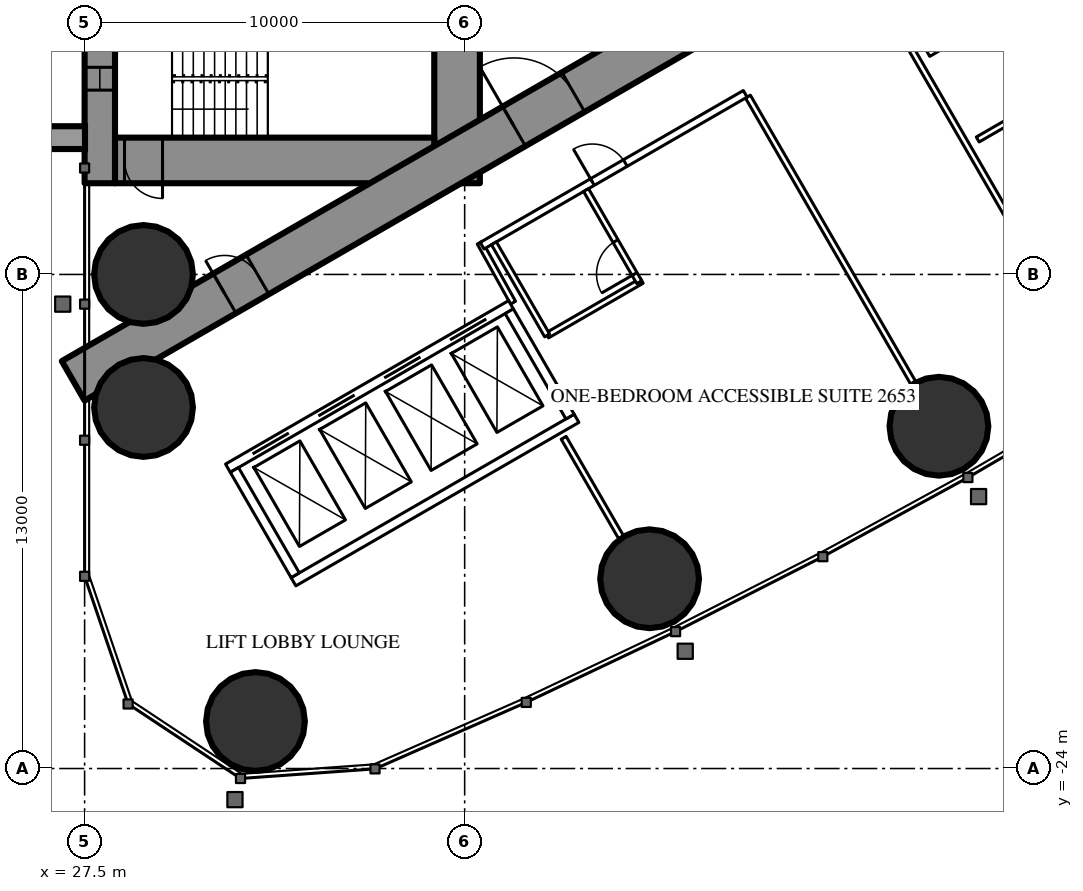
"""IFC4 building model, lengths in metres.
Left out: names, types, materials, properties, quantities, classifications, styles, units other than length and angle.
Written with IfcOpenShell. Run it as: python <this file> out.ifc"""

import sys

from ifc_helpers import new_model, si_unit, direction, frame, frame_2d, origin, origin_2d, place, context, subcontext, project, spatial, rectangle, hollow_circle, extrude, element, fill, save


model = new_model("IFC4")
c1 = context("Model", 3, precision=1e-05, world=origin(), true_north=direction((0.0, 1.0)))
c2 = subcontext(c1, "Body", "Model", "MODEL_VIEW")
j1 = project(units=[si_unit("LENGTHUNIT", "METRE"), si_unit("PLANEANGLEUNIT", "RADIAN")], contexts=[c1])
p1 = place(None, origin())
s1 = spatial("IfcSite", under=j1, at=p1, CompositionType="ELEMENT")
p2 = place(p1, origin())
s2 = spatial("IfcBuilding", under=s1, at=p2, CompositionType="ELEMENT")
p3 = place(p2, frame((0.0, 0.0, 101.1)))
s3 = spatial("IfcBuildingStorey", under=s2, at=p3, CompositionType="ELEMENT", Elevation=101.1)
for number, where, z_axis, x_axis in (
    (1, (31.996, -22.763, 0.0), (0.0, 0.0, 1.0), (1.0, 0.0, 0.0)),
    (2, (29.05, -11.0, 0.0), (0.0, 0.0, 1.0), (1.0, 0.0, 0.0)),
    (3, (29.05, -14.5, 0.0), (0.0, 0.0, 1.0), (1.0, 0.0, 0.0)),
    (4, (42.366, -19.007, 0.0), (0.0, 0.0, 1.0), (1.0, 0.0, 0.0)),
    (5, (49.979, -14.994, 0.0), (0.0, 0.0, 1.0), (1.0, 0.0, 0.0)),
):
    element("IfcColumn", number, at=place(p3, frame(where, z_axis=z_axis, x_axis=x_axis)), inside=s3, PredefinedType="COLUMN", context=c2, shape_type="SweptSolid", body=[
        extrude(hollow_circle(Radius=1.3, WallThickness=0.1, at=origin_2d()), origin(), (0.0, 0.0, 1.0), 3.5),
    ])
p4 = place(p3, frame((27.9, -8.6, 0.0), z_axis=(0.0, 0.0, 1.0), x_axis=(0.0, 1.0, 0.0)))
e6 = element("IfcWall", 6, at=p4, inside=s3, PredefinedType="SHEAR", context=c2, shape_type="SweptSolid", body=[
    extrude(rectangle(XDim=17.2, YDim=0.8, at=frame_2d((8.6, 0.0))), origin(), (0.0, 0.0, 1.0), 3.5),
])
p5 = place(p4, frame((2.45, 0.0, 0.6)))
e7 = element("IfcOpeningElement", 7, at=p5, cuts=e6, PredefinedType="OPENING", context=c2, shape_type="SweptSolid", body=[
    extrude(rectangle(XDim=0.6, YDim=2.1, at=frame_2d((0.3, 1.05))), frame((0.0, 0.41, 0.0), z_axis=(0.0, -1.0, 0.0), x_axis=(1.0, 0.0, 0.0)), (0.0, 0.0, 1.0), 0.82),
])
p6 = place(p4, frame((14.15, 0.0, 0.6)))
e8 = element("IfcOpeningElement", 8, at=p6, cuts=e6, PredefinedType="OPENING", context=c2, shape_type="SweptSolid", body=[
    extrude(rectangle(XDim=0.6, YDim=2.1, at=frame_2d((0.3, 1.05))), frame((0.0, 0.41, 0.0), z_axis=(0.0, -1.0, 0.0), x_axis=(1.0, 0.0, 0.0)), (0.0, 0.0, 1.0), 0.82),
])
p7 = place(p3, frame((37.3, -8.6, 0.0), z_axis=(0.0, 0.0, 1.0), x_axis=(0.0, 1.0, 0.0)))
e9 = element("IfcWall", 9, at=p7, inside=s3, PredefinedType="SHEAR", context=c2, shape_type="SweptSolid", body=[
    extrude(rectangle(XDim=17.2, YDim=1.2, at=frame_2d((8.6, 0.0))), origin(), (0.0, 0.0, 1.0), 3.5),
])
p8 = place(p7, frame((7.7, 0.0, 0.0)))
e10 = element("IfcOpeningElement", 10, at=p8, cuts=e9, PredefinedType="OPENING", context=c2, shape_type="SweptSolid", body=[
    extrude(rectangle(XDim=1.8, YDim=2.2, at=frame_2d((0.9, 1.1))), frame((0.0, 0.61, 0.0), z_axis=(0.0, -1.0, 0.0), x_axis=(1.0, 0.0, 0.0)), (0.0, 0.0, 1.0), 1.22),
])
p9 = place(p3, frame((28.3, -8.0, 0.0), z_axis=(0.0, 0.0, 1.0), x_axis=(1.0, 0.0, 0.0)))
e11 = element("IfcWall", 11, at=p9, inside=s3, PredefinedType="SHEAR", context=c2, shape_type="SweptSolid", body=[
    extrude(rectangle(XDim=8.4, YDim=1.2, at=frame_2d((4.2, 0.0))), origin(), (0.0, 0.0, 1.0), 3.5),
])
p10 = place(p9, frame((0.25, 0.0, 0.0)))
e12 = element("IfcOpeningElement", 12, at=p10, cuts=e11, PredefinedType="OPENING", context=c2, shape_type="SweptSolid", body=[
    extrude(rectangle(XDim=1.0, YDim=2.2, at=frame_2d((0.5, 1.1))), frame((0.0, 0.61, 0.0), z_axis=(0.0, -1.0, 0.0), x_axis=(1.0, 0.0, 0.0)), (0.0, 0.0, 1.0), 1.22),
])
p11 = place(p3, frame((27.2, -13.8, 0.0), z_axis=(0.0, 0.0, 1.0), x_axis=(0.866027159892, 0.499996958321, 0.0)))
e13 = element("IfcWall", 13, at=p11, inside=s3, PredefinedType="SHEAR", context=c2, shape_type="SweptSolid", body=[
    extrude(rectangle(XDim=27.947, YDim=1.2, at=frame_2d((13.973, 0.0))), origin(), (0.0, 0.0, 1.0), 3.5),
])
p12 = place(p11, frame((4.6, 0.0, 0.0)))
e14 = element("IfcOpeningElement", 14, at=p12, cuts=e13, PredefinedType="OPENING", context=c2, shape_type="SweptSolid", body=[
    extrude(rectangle(XDim=1.0, YDim=2.2, at=frame_2d((0.5, 1.1))), frame((0.0, 0.61, 0.0), z_axis=(0.0, -1.0, 0.0), x_axis=(1.0, 0.0, 0.0)), (0.0, 0.0, 1.0), 1.22),
])
p13 = place(p11, frame((13.395, 0.0, 0.0)))
e15 = element("IfcOpeningElement", 15, at=p13, cuts=e13, PredefinedType="OPENING", context=c2, shape_type="SweptSolid", body=[
    extrude(rectangle(XDim=1.8, YDim=2.2, at=frame_2d((0.9, 1.1))), frame((0.0, 0.61, 0.0), z_axis=(0.0, -1.0, 0.0), x_axis=(1.0, 0.0, 0.0)), (0.0, 0.0, 1.0), 1.22),
])
p14 = place(p3, frame((44.954, -6.321, 0.0), z_axis=(0.0, 0.0, 1.0), x_axis=(0.500018676722, -0.866014620505, 0.0)))
e16 = element("IfcWall", 16, at=p14, inside=s3, PredefinedType="PARTITIONING", context=c2, shape_type="SweptSolid", body=[
    extrude(rectangle(XDim=8.704, YDim=0.15, at=frame_2d((4.352, 0.0))), origin(), (0.0, 0.0, 1.0), 2.2),
])
p15 = place(p3, frame((48.719, -4.147, 0.0), z_axis=(0.0, 0.0, 1.0), x_axis=(0.499990498062, -0.866030889661, 0.0)))
e17 = element("IfcWall", 17, at=p15, inside=s3, PredefinedType="PARTITIONING", context=c2, shape_type="SweptSolid", body=[
    extrude(rectangle(XDim=11.406, YDim=0.15, at=frame_2d((5.703, 0.0))), origin(), (0.0, 0.0, 1.0), 3.25),
])
p16 = place(p3, frame((40.105, -15.299, 0.0), z_axis=(0.0, 0.0, 1.0), x_axis=(0.499978822259, -0.866037630414, 0.0)))
e18 = element("IfcWall", 18, at=p16, inside=s3, PredefinedType="PARTITIONING", context=c2, shape_type="SweptSolid", body=[
    extrude(rectangle(XDim=3.023, YDim=0.15, at=frame_2d((1.511, 0.0))), origin(), (0.0, 0.0, 1.0), 3.25),
])
p17 = place(p3, frame((38.773, -11.742, 0.0), z_axis=(0.0, 0.0, 1.0), x_axis=(-0.485528096672, 0.8742210632, 0.0)))
e19 = element("IfcWall", 19, at=p17, inside=s3, PredefinedType="PARTITIONING", context=c2, shape_type="SweptSolid", body=[
    extrude(rectangle(XDim=1.805, YDim=0.15, at=frame_2d((0.903, 0.0))), origin(), (0.0, 0.0, 1.0), 3.25),
])
p18 = place(p3, frame((37.96, -10.243, 0.0), z_axis=(0.0, 0.0, 1.0), x_axis=(0.86603350054, 0.499985975746, 0.0)))
e20 = element("IfcWall", 20, at=p18, inside=s3, PredefinedType="PARTITIONING", context=c2, shape_type="SweptSolid", body=[
    extrude(rectangle(XDim=7.993, YDim=0.2, at=frame_2d((3.997, 0.0))), origin(), (0.0, 0.0, 1.0), 3.25),
])
p19 = place(p18, frame((3.35, 0.0, 0.0)))
e21 = element("IfcOpeningElement", 21, at=p19, cuts=e20, PredefinedType="OPENING", context=c2, shape_type="SweptSolid", body=[
    extrude(rectangle(XDim=1.0, YDim=2.2, at=frame_2d((0.5, 1.1))), frame((0.0, 0.11, 0.0), z_axis=(0.0, -1.0, 0.0), x_axis=(1.0, 0.0, 0.0)), (0.0, 0.0, 1.0), 0.22),
])
for number, where, z_axis, x_axis in (
    (22, (51.0, -7.449, 0.0), (0.0, 0.0, 1.0), (0.866, 0.5, 0.0)),
    (23, (49.7, -5.198, 0.0), (0.0, 0.0, 1.0), (0.866, 0.5, 0.0)),
):
    element("IfcWall", number, at=place(p3, frame(where, z_axis=z_axis, x_axis=x_axis)), inside=s3, PredefinedType="PARTITIONING", context=c2, shape_type="SweptSolid", body=[
        extrude(rectangle(XDim=2.475, YDim=0.15, at=frame_2d((1.237, 0.0))), origin(), (0.0, 0.0, 1.0), 3.25),
    ])
p20 = place(p3, frame((39.67, -12.605, 0.0), z_axis=(0.0, 0.0, 1.0), x_axis=(0.866018712932, 0.500011588718, 0.0)))
e24 = element("IfcWall", 24, at=p20, inside=s3, PredefinedType="PARTITIONING", context=c2, shape_type="SweptSolid", body=[
    extrude(rectangle(XDim=2.875, YDim=0.15, at=frame_2d((1.438, 0.0))), origin(), (0.0, 0.0, 1.0), 3.25),
])
p21 = place(p3, frame((40.695, -8.78, 0.0), z_axis=(0.0, 0.0, 1.0), x_axis=(0.500049511043, -0.865996816683, 0.0)))
e25 = element("IfcWall", 25, at=p21, inside=s3, PredefinedType="PARTITIONING", context=c2, shape_type="SweptSolid", body=[
    extrude(rectangle(XDim=2.8, YDim=0.15, at=frame_2d((1.4, 0.0))), origin(), (0.0, 0.0, 1.0), 3.25),
])
p22 = place(p21, frame((1.55, 0.0, 0.0)))
e26 = element("IfcOpeningElement", 26, at=p22, cuts=e25, PredefinedType="OPENING", context=c2, shape_type="SweptSolid", body=[
    extrude(rectangle(XDim=1.0, YDim=2.2, at=frame_2d((0.5, 1.1))), frame((0.0, 0.085, 0.0), z_axis=(0.0, -1.0, 0.0), x_axis=(1.0, 0.0, 0.0)), (0.0, 0.0, 1.0), 0.17),
])
p23 = place(p3, frame((38.27, -10.18, 0.0), z_axis=(0.0, 0.0, 1.0), x_axis=(0.500049511043, -0.865996816683, 0.0)))
e27 = element("IfcWall", 27, at=p23, inside=s3, PredefinedType="PARTITIONING", context=c2, shape_type="SweptSolid", body=[
    extrude(rectangle(XDim=2.8, YDim=0.15, at=frame_2d((1.4, 0.0))), origin(), (0.0, 0.0, 1.0), 3.25),
])
p24 = place(p3, frame((31.271, -16.097, 0.0), z_axis=(0.0, 0.0, 1.0), x_axis=(0.86604045752, 0.499973925258, 0.0)))
e28 = element("IfcWall", 28, at=p24, inside=s3, PredefinedType="PARTITIONING", context=c2, shape_type="SweptSolid", body=[
    extrude(rectangle(XDim=8.6, YDim=0.25, at=frame_2d((4.3, 0.0))), origin(), (0.0, 0.0, 1.0), 3.25),
])
p25 = place(p24, frame((0.75, 0.0, 0.0)))
e29 = element("IfcOpeningElement", 29, at=p25, cuts=e28, PredefinedType="OPENING", context=c2, shape_type="SweptSolid", body=[
    extrude(rectangle(XDim=1.1, YDim=2.2, at=frame_2d((0.55, 1.1))), frame((0.0, 0.135, 0.0), z_axis=(0.0, -1.0, 0.0), x_axis=(1.0, 0.0, 0.0)), (0.0, 0.0, 1.0), 0.27),
])
p26 = place(p24, frame((2.75, 0.0, 0.0)))
e30 = element("IfcOpeningElement", 30, at=p26, cuts=e28, PredefinedType="OPENING", context=c2, shape_type="SweptSolid", body=[
    extrude(rectangle(XDim=1.1, YDim=2.2, at=frame_2d((0.55, 1.1))), frame((0.0, 0.135, 0.0), z_axis=(0.0, -1.0, 0.0), x_axis=(1.0, 0.0, 0.0)), (0.0, 0.0, 1.0), 0.27),
])
p27 = place(p24, frame((4.75, 0.0, 0.0)))
e31 = element("IfcOpeningElement", 31, at=p27, cuts=e28, PredefinedType="OPENING", context=c2, shape_type="SweptSolid", body=[
    extrude(rectangle(XDim=1.1, YDim=2.2, at=frame_2d((0.55, 1.1))), frame((0.0, 0.135, 0.0), z_axis=(0.0, -1.0, 0.0), x_axis=(1.0, 0.0, 0.0)), (0.0, 0.0, 1.0), 0.27),
])
p28 = place(p24, frame((6.75, 0.0, 0.0)))
e32 = element("IfcOpeningElement", 32, at=p28, cuts=e28, PredefinedType="OPENING", context=c2, shape_type="SweptSolid", body=[
    extrude(rectangle(XDim=1.1, YDim=2.2, at=frame_2d((0.55, 1.1))), frame((0.0, 0.135, 0.0), z_axis=(0.0, -1.0, 0.0), x_axis=(1.0, 0.0, 0.0)), (0.0, 0.0, 1.0), 0.27),
])
p29 = place(p3, frame((32.996, -19.086, 0.0), z_axis=(0.0, 0.0, 1.0), x_axis=(0.866028165386, 0.499995216735, 0.0)))
e33 = element("IfcWall", 33, at=p29, inside=s3, PredefinedType="PARTITIONING", context=c2, shape_type="SweptSolid", body=[
    extrude(rectangle(XDim=8.6, YDim=0.25, at=frame_2d((4.3, 0.0))), origin(), (0.0, 0.0, 1.0), 3.25),
])
for number, where, z_axis, x_axis in (
    (34, (31.441, -16.143, 0.0), (0.0, 0.0, 1.0), (0.5, -0.866, 0.0)),
    (35, (38.673, -11.968, 0.0), (0.0, 0.0, 1.0), (0.5, -0.866, 0.0)),
):
    element("IfcWall", number, at=place(p3, frame(where, z_axis=z_axis, x_axis=x_axis)), inside=s3, PredefinedType="PARTITIONING", context=c2, shape_type="SweptSolid", body=[
        extrude(rectangle(XDim=3.201, YDim=0.25, at=frame_2d((1.6, 0.0))), origin(), (0.0, 0.0, 1.0), 3.25),
    ])
p30 = place(p22, origin())
e36 = element("IfcDoor", 36, at=p30, inside=s3, OperationType="SINGLE_SWING_RIGHT", PredefinedType="DOOR", context=c2, shape_type="SweptSolid", body=[
    extrude(rectangle(XDim=1.0, YDim=2.2, at=frame_2d((0.5, 1.1))), frame((0.0, 0.025, 0.0), z_axis=(0.0, -1.0, 0.0), x_axis=(1.0, 0.0, 0.0)), (0.0, 0.0, 1.0), 0.05),
])
fill(e26, e36)
p31 = place(p19, origin())
e37 = element("IfcDoor", 37, at=p31, inside=s3, OperationType="SINGLE_SWING_LEFT", PredefinedType="DOOR", context=c2, shape_type="SweptSolid", body=[
    extrude(rectangle(XDim=1.0, YDim=2.2, at=frame_2d((0.5, 1.1))), frame((0.0, 0.025, 0.0), z_axis=(0.0, -1.0, 0.0), x_axis=(1.0, 0.0, 0.0)), (0.0, 0.0, 1.0), 0.05),
])
fill(e21, e37)
p32 = place(p12, origin())
e38 = element("IfcDoor", 38, at=p32, inside=s3, OperationType="SINGLE_SWING_LEFT", PredefinedType="DOOR", context=c2, shape_type="SweptSolid", body=[
    extrude(rectangle(XDim=1.0, YDim=2.2, at=frame_2d((0.5, 1.1))), frame((0.0, 0.025, 0.0), z_axis=(0.0, -1.0, 0.0), x_axis=(1.0, 0.0, 0.0)), (0.0, 0.0, 1.0), 0.05),
])
fill(e14, e38)
p33 = place(p13, origin())
e39 = element("IfcDoor", 39, at=p33, inside=s3, OperationType="DOUBLE_DOOR_SINGLE_SWING", PredefinedType="DOOR", context=c2, shape_type="SweptSolid", body=[
    extrude(rectangle(XDim=1.8, YDim=2.2, at=frame_2d((0.9, 1.1))), frame((0.0, 0.025, 0.0), z_axis=(0.0, -1.0, 0.0), x_axis=(1.0, 0.0, 0.0)), (0.0, 0.0, 1.0), 0.05),
])
fill(e15, e39)
p34 = place(p10, origin())
e40 = element("IfcDoor", 40, at=p34, inside=s3, OperationType="SINGLE_SWING_RIGHT", PredefinedType="DOOR", context=c2, shape_type="SweptSolid", body=[
    extrude(rectangle(XDim=1.0, YDim=2.2, at=frame_2d((0.5, 1.1))), frame((0.0, 0.025, 0.0), z_axis=(0.0, -1.0, 0.0), x_axis=(1.0, 0.0, 0.0)), (0.0, 0.0, 1.0), 0.05),
])
fill(e12, e40)
p35 = place(p25, origin())
e41 = element("IfcDoor", 41, at=p35, inside=s3, OperationType="DOUBLE_DOOR_SLIDING", PredefinedType="USERDEFINED", context=c2, shape_type="SweptSolid", body=[
    extrude(rectangle(XDim=1.1, YDim=2.2, at=frame_2d((0.55, 1.1))), frame((0.0, 0.025, 0.0), z_axis=(0.0, -1.0, 0.0), x_axis=(1.0, 0.0, 0.0)), (0.0, 0.0, 1.0), 0.05),
])
fill(e29, e41)
p36 = place(p26, origin())
e42 = element("IfcDoor", 42, at=p36, inside=s3, OperationType="DOUBLE_DOOR_SLIDING", PredefinedType="USERDEFINED", context=c2, shape_type="SweptSolid", body=[
    extrude(rectangle(XDim=1.1, YDim=2.2, at=frame_2d((0.55, 1.1))), frame((0.0, 0.025, 0.0), z_axis=(0.0, -1.0, 0.0), x_axis=(1.0, 0.0, 0.0)), (0.0, 0.0, 1.0), 0.05),
])
fill(e30, e42)
p37 = place(p27, origin())
e43 = element("IfcDoor", 43, at=p37, inside=s3, OperationType="DOUBLE_DOOR_SLIDING", PredefinedType="USERDEFINED", context=c2, shape_type="SweptSolid", body=[
    extrude(rectangle(XDim=1.1, YDim=2.2, at=frame_2d((0.55, 1.1))), frame((0.0, 0.025, 0.0), z_axis=(0.0, -1.0, 0.0), x_axis=(1.0, 0.0, 0.0)), (0.0, 0.0, 1.0), 0.05),
])
fill(e31, e43)
p38 = place(p28, origin())
e44 = element("IfcDoor", 44, at=p38, inside=s3, OperationType="DOUBLE_DOOR_SLIDING", PredefinedType="USERDEFINED", context=c2, shape_type="SweptSolid", body=[
    extrude(rectangle(XDim=1.1, YDim=2.2, at=frame_2d((0.55, 1.1))), frame((0.0, 0.025, 0.0), z_axis=(0.0, -1.0, 0.0), x_axis=(1.0, 0.0, 0.0)), (0.0, 0.0, 1.0), 0.05),
])
fill(e32, e44)
p39 = place(p5, origin())
e45 = element("IfcWindow", 45, at=p39, inside=s3, PartitioningType="SINGLE_PANEL", PredefinedType="WINDOW", context=c2, shape_type="SweptSolid", body=[
    extrude(rectangle(XDim=0.6, YDim=2.1, at=frame_2d((0.3, 1.05))), frame((0.0, 0.03, 0.0), z_axis=(0.0, -1.0, 0.0), x_axis=(1.0, 0.0, 0.0)), (0.0, 0.0, 1.0), 0.06),
])
fill(e7, e45)
save(model, sys.argv[1])
